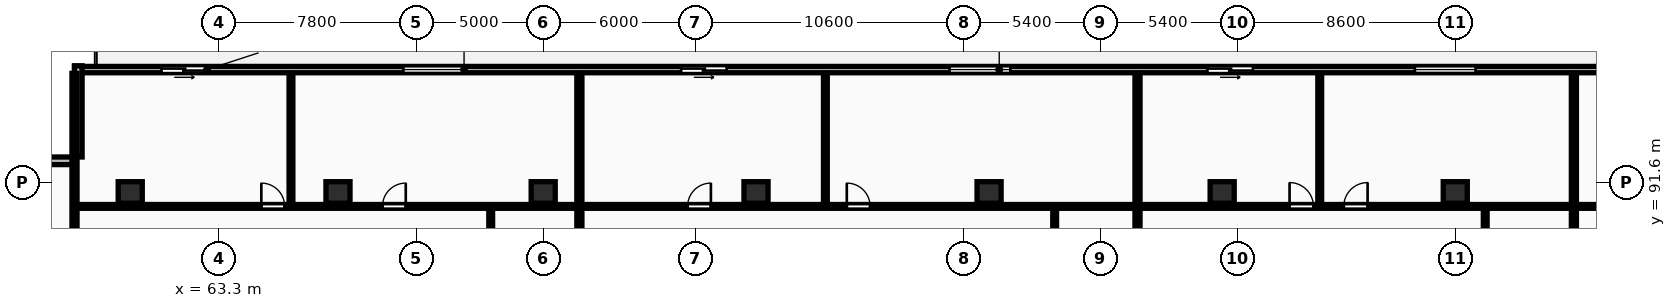
"""IFC4 building model, lengths in metres.
Left out: names, types, materials, properties, quantities, classifications, styles, units other than length and angle.
Written with IfcOpenShell. Run it as: python <this file> out.ifc"""

import sys

from ifc_helpers import new_model, si_unit, direction, frame, frame_2d, origin, origin_2d, place, context, subcontext, project, spatial, rectangle, extrude, element, fill, save


model = new_model("IFC4")
c1 = context("Model", 3, precision=1e-05, world=origin(), true_north=direction((0.0, 1.0)))
c2 = subcontext(c1, "Body", "Model", "MODEL_VIEW")
j1 = project(units=[si_unit("LENGTHUNIT", "METRE"), si_unit("PLANEANGLEUNIT", "RADIAN")], contexts=[c1])
p1 = place(None, origin())
s1 = spatial("IfcSite", under=j1, at=p1, CompositionType="ELEMENT")
p2 = place(p1, origin())
s2 = spatial("IfcBuilding", under=s1, at=p2, CompositionType="ELEMENT")
p3 = place(p2, frame((0.0, 0.0, 93.8)))
s3 = spatial("IfcBuildingStorey", under=s2, at=p3, CompositionType="ELEMENT", Elevation=93.8)
for number, where, z_axis, x_axis in (
    (1, (59.8, 91.2, 0.0), (0.0, 0.0, 1.0), (1.0, 0.0, 0.0)),
    (2, (68.0, 91.2, 0.0), (0.0, 0.0, 1.0), (1.0, 0.0, 0.0)),
    (3, (76.1, 91.2, 0.0), (0.0, 0.0, 1.0), (1.0, 0.0, 0.0)),
    (4, (84.5, 91.2, 0.0), (0.0, 0.0, 1.0), (1.0, 0.0, 0.0)),
    (5, (93.7, 91.2, 0.0), (0.0, 0.0, 1.0), (1.0, 0.0, 0.0)),
    (6, (102.9, 91.2, 0.0), (0.0, 0.0, 1.0), (1.0, 0.0, 0.0)),
    (7, (112.1, 91.2, 0.0), (0.0, 0.0, 1.0), (1.0, 0.0, 0.0)),
):
    element("IfcColumn", number, at=place(p3, frame(where, z_axis=z_axis, x_axis=x_axis)), inside=s3, PredefinedType="COLUMN", context=c2, shape_type="SweptSolid", body=[
        extrude(rectangle(XDim=0.95, YDim=0.85, at=origin_2d()), origin(), (0.0, 0.0, 1.0), 3.25),
    ])
p4 = place(p3, frame((130.6, 96.05, 0.0), z_axis=(0.0, 0.0, 1.0), x_axis=(-1.0, 0.0, 0.0)))
e8 = element("IfcWall", 8, at=p4, inside=s3, PredefinedType="STANDARD", context=c2, shape_type="SweptSolid", body=[
    extrude(rectangle(XDim=73.0, YDim=0.25, at=frame_2d((36.5, 0.0))), origin(), (0.0, 0.0, 1.0), 2.97),
])
p5 = place(p4, frame((67.768, 0.0, 0.0)))
e9 = element("IfcOpeningElement", 9, at=p5, cuts=e8, PredefinedType="OPENING", context=c2, shape_type="SweptSolid", body=[
    extrude(rectangle(XDim=1.8, YDim=2.2, at=frame_2d((0.9, 1.1))), frame((0.0, 0.135, 0.0), z_axis=(0.0, -1.0, 0.0), x_axis=(1.0, 0.0, 0.0)), (0.0, 0.0, 1.0), 0.27),
])
p6 = place(p4, frame((57.624, 0.0, 0.85)))
e10 = element("IfcOpeningElement", 10, at=p6, cuts=e8, PredefinedType="OPENING", context=c2, shape_type="SweptSolid", body=[
    extrude(rectangle(XDim=2.4, YDim=1.9, at=frame_2d((1.2, 0.95))), frame((0.0, 0.135, 0.0), z_axis=(0.0, -1.0, 0.0), x_axis=(1.0, 0.0, 0.0)), (0.0, 0.0, 1.0), 0.27),
])
p7 = place(p4, frame((47.257, 0.0, 0.0)))
e11 = element("IfcOpeningElement", 11, at=p7, cuts=e8, PredefinedType="OPENING", context=c2, shape_type="SweptSolid", body=[
    extrude(rectangle(XDim=1.8, YDim=2.2, at=frame_2d((0.9, 1.1))), frame((0.0, 0.135, 0.0), z_axis=(0.0, -1.0, 0.0), x_axis=(1.0, 0.0, 0.0)), (0.0, 0.0, 1.0), 0.27),
])
p8 = place(p4, frame((36.062, 0.0, 0.85)))
e12 = element("IfcOpeningElement", 12, at=p8, cuts=e8, PredefinedType="OPENING", context=c2, shape_type="SweptSolid", body=[
    extrude(rectangle(XDim=2.4, YDim=1.9, at=frame_2d((1.2, 0.95))), frame((0.0, 0.135, 0.0), z_axis=(0.0, -1.0, 0.0), x_axis=(1.0, 0.0, 0.0)), (0.0, 0.0, 1.0), 0.27),
])
p9 = place(p4, frame((26.486, 0.0, 0.0)))
e13 = element("IfcOpeningElement", 13, at=p9, cuts=e8, PredefinedType="OPENING", context=c2, shape_type="SweptSolid", body=[
    extrude(rectangle(XDim=1.8, YDim=2.2, at=frame_2d((0.9, 1.1))), frame((0.0, 0.135, 0.0), z_axis=(0.0, -1.0, 0.0), x_axis=(1.0, 0.0, 0.0)), (0.0, 0.0, 1.0), 0.27),
])
p10 = place(p4, frame((17.694, 0.0, 0.85)))
e14 = element("IfcOpeningElement", 14, at=p10, cuts=e8, PredefinedType="OPENING", context=c2, shape_type="SweptSolid", body=[
    extrude(rectangle(XDim=2.4, YDim=1.9, at=frame_2d((1.2, 0.95))), frame((0.0, 0.135, 0.0), z_axis=(0.0, -1.0, 0.0), x_axis=(1.0, 0.0, 0.0)), (0.0, 0.0, 1.0), 0.27),
])
p11 = place(p4, frame((7.989, 0.0, 0.0)))
e15 = element("IfcOpeningElement", 15, at=p11, cuts=e8, PredefinedType="OPENING", context=c2, shape_type="SweptSolid", body=[
    extrude(rectangle(XDim=1.8, YDim=2.2, at=frame_2d((0.9, 1.1))), frame((0.0, 0.135, 0.0), z_axis=(0.0, -1.0, 0.0), x_axis=(1.0, 0.0, 0.0)), (0.0, 0.0, 1.0), 0.27),
])
p12 = place(p4, frame((0.9, 0.0, 0.85)))
e16 = element("IfcOpeningElement", 16, at=p12, cuts=e8, PredefinedType="OPENING", context=c2, shape_type="SweptSolid", body=[
    extrude(rectangle(XDim=2.4, YDim=1.9, at=frame_2d((1.2, 0.95))), frame((0.0, 0.135, 0.0), z_axis=(0.0, -1.0, 0.0), x_axis=(1.0, 0.0, 0.0)), (0.0, 0.0, 1.0), 0.27),
])
p13 = place(p3, frame((57.75, 96.2, 0.0), z_axis=(0.0, 0.0, 1.0), x_axis=(0.0, -1.0, 0.0)))
e17 = element("IfcWall", 17, at=p13, inside=s3, PredefinedType="STANDARD", context=c2, shape_type="SweptSolid", body=[
    extrude(rectangle(XDim=3.6, YDim=0.3, at=frame_2d((1.8, 0.0))), origin(), (0.0, 0.0, 1.0), 2.97),
])
p14 = place(p3, frame((57.6, 92.45, 0.0), z_axis=(0.0, 0.0, 1.0), x_axis=(-1.0, 0.0, 0.0)))
e18 = element("IfcWall", 18, at=p14, inside=s3, PredefinedType="STANDARD", context=c2, shape_type="SweptSolid", body=[
    extrude(rectangle(XDim=3.6, YDim=0.3, at=frame_2d((1.8, 0.0))), origin(), (0.0, 0.0, 1.0), 2.97),
])
for number, where, z_axis, x_axis in (
    (19, (57.6, 69.83, 0.0), (0.0, 0.0, 1.0), (0.0, 1.0, 0.0)),
    (20, (77.528, 69.83, 0.0), (0.0, 0.0, 1.0), (0.0, 1.0, 0.0)),
):
    element("IfcWall", number, at=place(p3, frame(where, z_axis=z_axis, x_axis=x_axis)), inside=s3, PredefinedType="PARTITIONING", context=c2, shape_type="SweptSolid", body=[
        extrude(rectangle(XDim=26.07, YDim=0.2, at=frame_2d((13.035, 0.0))), origin(), (0.0, 0.0, 1.0), 2.97),
    ])
p15 = place(p3, frame((74.028, 69.81, 0.0), z_axis=(0.0, 0.0, 1.0), x_axis=(0.0, 1.0, 0.0)))
e21 = element("IfcWall", 21, at=p15, inside=s3, PredefinedType="PARTITIONING", context=c2, shape_type="SweptSolid", body=[
    extrude(rectangle(XDim=20.78, YDim=0.15, at=frame_2d((10.39, 0.0))), origin(), (0.0, 0.0, 1.0), 2.97),
])
p16 = place(p15, frame((2.406, 0.0, 0.0)))
e22 = element("IfcOpeningElement", 22, at=p16, cuts=e21, PredefinedType="OPENING", context=c2, shape_type="SweptSolid", body=[
    extrude(rectangle(XDim=0.96, YDim=2.1, at=frame_2d((0.48, 1.05))), frame((0.0, 0.085, 0.0), z_axis=(0.0, -1.0, 0.0), x_axis=(1.0, 0.0, 0.0)), (0.0, 0.0, 1.0), 0.17),
])
p17 = place(p15, frame((6.133, 0.0, 0.0)))
e23 = element("IfcOpeningElement", 23, at=p17, cuts=e21, PredefinedType="OPENING", context=c2, shape_type="SweptSolid", body=[
    extrude(rectangle(XDim=0.88, YDim=2.06, at=frame_2d((0.44, 1.03))), frame((0.0, 0.085, 0.0), z_axis=(0.0, -1.0, 0.0), x_axis=(1.0, 0.0, 0.0)), (0.0, 0.0, 1.0), 0.17),
])
p18 = place(p15, frame((11.615, 0.0, 0.0)))
e24 = element("IfcOpeningElement", 24, at=p18, cuts=e21, PredefinedType="OPENING", context=c2, shape_type="SweptSolid", body=[
    extrude(rectangle(XDim=0.84, YDim=2.04, at=frame_2d((0.42, 1.02))), frame((0.0, 0.085, 0.0), z_axis=(0.0, -1.0, 0.0), x_axis=(1.0, 0.0, 0.0)), (0.0, 0.0, 1.0), 0.17),
])
p19 = place(p3, frame((66.144, 90.73, 0.0), z_axis=(0.0, 0.0, 1.0), x_axis=(0.0, 1.0, 0.0)))
e25 = element("IfcWall", 25, at=p19, inside=s3, PredefinedType="PARTITIONING", context=c2, shape_type="SweptSolid", body=[
    extrude(rectangle(XDim=5.17, YDim=0.15, at=frame_2d((2.585, 0.0))), origin(), (0.0, 0.0, 1.0), 2.97),
])
p20 = place(p3, frame((57.68, 90.65, 0.0), z_axis=(0.0, 0.0, 1.0), x_axis=(1.0, 0.0, 0.0)))
e26 = element("IfcWall", 26, at=p20, inside=s3, PredefinedType="PARTITIONING", context=c2, shape_type="SweptSolid", body=[
    extrude(rectangle(XDim=19.769, YDim=0.15, at=frame_2d((9.884, 0.0))), origin(), (0.0, 0.0, 1.0), 2.97),
])
p21 = place(p20, frame((7.294, 0.0, 0.0)))
e27 = element("IfcOpeningElement", 27, at=p21, cuts=e26, PredefinedType="OPENING", context=c2, shape_type="SweptSolid", body=[
    extrude(rectangle(XDim=0.92, YDim=2.08, at=frame_2d((0.46, 1.04))), frame((0.0, 0.085, 0.0), z_axis=(0.0, -1.0, 0.0), x_axis=(1.0, 0.0, 0.0)), (0.0, 0.0, 1.0), 0.17),
])
p22 = place(p20, frame((12.076, 0.0, 0.0)))
e28 = element("IfcOpeningElement", 28, at=p22, cuts=e26, PredefinedType="OPENING", context=c2, shape_type="SweptSolid", body=[
    extrude(rectangle(XDim=0.92, YDim=2.08, at=frame_2d((0.46, 1.04))), frame((0.0, 0.085, 0.0), z_axis=(0.0, -1.0, 0.0), x_axis=(1.0, 0.0, 0.0)), (0.0, 0.0, 1.0), 0.17),
])
p23 = place(p3, frame((99.558, 69.83, 0.0), z_axis=(0.0, 0.0, 1.0), x_axis=(0.0, 1.0, 0.0)))
e29 = element("IfcWall", 29, at=p23, inside=s3, PredefinedType="PARTITIONING", context=c2, shape_type="SweptSolid", body=[
    extrude(rectangle(XDim=26.07, YDim=0.2, at=frame_2d((13.035, 0.0))), origin(), (0.0, 0.0, 1.0), 2.97),
])
p24 = place(p3, frame((96.288, 69.81, 0.0), z_axis=(0.0, 0.0, 1.0), x_axis=(0.0, 1.0, 0.0)))
e30 = element("IfcWall", 30, at=p24, inside=s3, PredefinedType="PARTITIONING", context=c2, shape_type="SweptSolid", body=[
    extrude(rectangle(XDim=20.78, YDim=0.15, at=frame_2d((10.39, 0.0))), origin(), (0.0, 0.0, 1.0), 2.97),
])
p25 = place(p24, frame((2.406, 0.0, 0.0)))
e31 = element("IfcOpeningElement", 31, at=p25, cuts=e30, PredefinedType="OPENING", context=c2, shape_type="SweptSolid", body=[
    extrude(rectangle(XDim=0.96, YDim=2.1, at=frame_2d((0.48, 1.05))), frame((0.0, 0.085, 0.0), z_axis=(0.0, -1.0, 0.0), x_axis=(1.0, 0.0, 0.0)), (0.0, 0.0, 1.0), 0.17),
])
p26 = place(p24, frame((6.133, 0.0, 0.0)))
e32 = element("IfcOpeningElement", 32, at=p26, cuts=e30, PredefinedType="OPENING", context=c2, shape_type="SweptSolid", body=[
    extrude(rectangle(XDim=0.88, YDim=2.06, at=frame_2d((0.44, 1.03))), frame((0.0, 0.085, 0.0), z_axis=(0.0, -1.0, 0.0), x_axis=(1.0, 0.0, 0.0)), (0.0, 0.0, 1.0), 0.17),
])
p27 = place(p24, frame((11.615, 0.0, 0.0)))
e33 = element("IfcOpeningElement", 33, at=p27, cuts=e30, PredefinedType="OPENING", context=c2, shape_type="SweptSolid", body=[
    extrude(rectangle(XDim=0.84, YDim=2.04, at=frame_2d((0.42, 1.02))), frame((0.0, 0.085, 0.0), z_axis=(0.0, -1.0, 0.0), x_axis=(1.0, 0.0, 0.0)), (0.0, 0.0, 1.0), 0.17),
])
p28 = place(p3, frame((87.238, 90.73, 0.0), z_axis=(0.0, 0.0, 1.0), x_axis=(0.0, 1.0, 0.0)))
e34 = element("IfcWall", 34, at=p28, inside=s3, PredefinedType="PARTITIONING", context=c2, shape_type="SweptSolid", body=[
    extrude(rectangle(XDim=5.17, YDim=0.15, at=frame_2d((2.585, 0.0))), origin(), (0.0, 0.0, 1.0), 2.97),
])
p29 = place(p3, frame((77.608, 90.65, 0.0), z_axis=(0.0, 0.0, 1.0), x_axis=(1.0, 0.0, 0.0)))
e35 = element("IfcWall", 35, at=p29, inside=s3, PredefinedType="PARTITIONING", context=c2, shape_type="SweptSolid", body=[
    extrude(rectangle(XDim=21.87, YDim=0.15, at=frame_2d((10.935, 0.0))), origin(), (0.0, 0.0, 1.0), 2.97),
])
p30 = place(p29, frame((4.191, 0.0, 0.0)))
e36 = element("IfcOpeningElement", 36, at=p30, cuts=e35, PredefinedType="OPENING", context=c2, shape_type="SweptSolid", body=[
    extrude(rectangle(XDim=0.92, YDim=2.08, at=frame_2d((0.46, 1.04))), frame((0.0, 0.085, 0.0), z_axis=(0.0, -1.0, 0.0), x_axis=(1.0, 0.0, 0.0)), (0.0, 0.0, 1.0), 0.17),
])
p31 = place(p29, frame((10.475, 0.0, 0.0)))
e37 = element("IfcOpeningElement", 37, at=p31, cuts=e35, PredefinedType="OPENING", context=c2, shape_type="SweptSolid", body=[
    extrude(rectangle(XDim=0.92, YDim=2.08, at=frame_2d((0.46, 1.04))), frame((0.0, 0.085, 0.0), z_axis=(0.0, -1.0, 0.0), x_axis=(1.0, 0.0, 0.0)), (0.0, 0.0, 1.0), 0.17),
])
p32 = place(p3, frame((116.783, 69.83, 0.0), z_axis=(0.0, 0.0, 1.0), x_axis=(0.0, 1.0, 0.0)))
e38 = element("IfcWall", 38, at=p32, inside=s3, PredefinedType="PARTITIONING", context=c2, shape_type="SweptSolid", body=[
    extrude(rectangle(XDim=26.07, YDim=0.2, at=frame_2d((13.035, 0.0))), origin(), (0.0, 0.0, 1.0), 2.97),
])
p33 = place(p3, frame((113.283, 69.81, 0.0), z_axis=(0.0, 0.0, 1.0), x_axis=(0.0, 1.0, 0.0)))
e39 = element("IfcWall", 39, at=p33, inside=s3, PredefinedType="PARTITIONING", context=c2, shape_type="SweptSolid", body=[
    extrude(rectangle(XDim=20.78, YDim=0.15, at=frame_2d((10.39, 0.0))), origin(), (0.0, 0.0, 1.0), 2.97),
])
p34 = place(p33, frame((2.406, 0.0, 0.0)))
e40 = element("IfcOpeningElement", 40, at=p34, cuts=e39, PredefinedType="OPENING", context=c2, shape_type="SweptSolid", body=[
    extrude(rectangle(XDim=0.96, YDim=2.1, at=frame_2d((0.48, 1.05))), frame((0.0, 0.085, 0.0), z_axis=(0.0, -1.0, 0.0), x_axis=(1.0, 0.0, 0.0)), (0.0, 0.0, 1.0), 0.17),
])
p35 = place(p33, frame((6.133, 0.0, 0.0)))
e41 = element("IfcOpeningElement", 41, at=p35, cuts=e39, PredefinedType="OPENING", context=c2, shape_type="SweptSolid", body=[
    extrude(rectangle(XDim=0.88, YDim=2.06, at=frame_2d((0.44, 1.03))), frame((0.0, 0.085, 0.0), z_axis=(0.0, -1.0, 0.0), x_axis=(1.0, 0.0, 0.0)), (0.0, 0.0, 1.0), 0.17),
])
p36 = place(p33, frame((11.615, 0.0, 0.0)))
e42 = element("IfcOpeningElement", 42, at=p36, cuts=e39, PredefinedType="OPENING", context=c2, shape_type="SweptSolid", body=[
    extrude(rectangle(XDim=0.84, YDim=2.04, at=frame_2d((0.42, 1.02))), frame((0.0, 0.085, 0.0), z_axis=(0.0, -1.0, 0.0), x_axis=(1.0, 0.0, 0.0)), (0.0, 0.0, 1.0), 0.17),
])
p37 = place(p3, frame((106.75, 90.73, 0.0), z_axis=(0.0, 0.0, 1.0), x_axis=(0.0, 1.0, 0.0)))
e43 = element("IfcWall", 43, at=p37, inside=s3, PredefinedType="PARTITIONING", context=c2, shape_type="SweptSolid", body=[
    extrude(rectangle(XDim=5.17, YDim=0.15, at=frame_2d((2.585, 0.0))), origin(), (0.0, 0.0, 1.0), 2.97),
])
p38 = place(p3, frame((99.638, 90.65, 0.0), z_axis=(0.0, 0.0, 1.0), x_axis=(1.0, 0.0, 0.0)))
e44 = element("IfcWall", 44, at=p38, inside=s3, PredefinedType="PARTITIONING", context=c2, shape_type="SweptSolid", body=[
    extrude(rectangle(XDim=17.065, YDim=0.15, at=frame_2d((8.532, 0.0))), origin(), (0.0, 0.0, 1.0), 2.97),
])
p39 = place(p38, frame((5.922, 0.0, 0.0)))
e45 = element("IfcOpeningElement", 45, at=p39, cuts=e44, PredefinedType="OPENING", context=c2, shape_type="SweptSolid", body=[
    extrude(rectangle(XDim=0.94, YDim=2.1, at=frame_2d((0.47, 1.05))), frame((0.0, 0.085, 0.0), z_axis=(0.0, -1.0, 0.0), x_axis=(1.0, 0.0, 0.0)), (0.0, 0.0, 1.0), 0.17),
])
p40 = place(p38, frame((8.062, 0.0, 0.0)))
e46 = element("IfcOpeningElement", 46, at=p40, cuts=e44, PredefinedType="OPENING", context=c2, shape_type="SweptSolid", body=[
    extrude(rectangle(XDim=0.94, YDim=2.1, at=frame_2d((0.47, 1.05))), frame((0.0, 0.085, 0.0), z_axis=(0.0, -1.0, 0.0), x_axis=(1.0, 0.0, 0.0)), (0.0, 0.0, 1.0), 0.17),
])
p41 = place(p3, frame((116.863, 90.65, 0.0), z_axis=(0.0, 0.0, 1.0), x_axis=(1.0, 0.0, 0.0)))
e47 = element("IfcWall", 47, at=p41, inside=s3, PredefinedType="PARTITIONING", context=c2, shape_type="SweptSolid", body=[
    extrude(rectangle(XDim=13.657, YDim=0.15, at=frame_2d((6.829, 0.0))), origin(), (0.0, 0.0, 1.0), 2.97),
])
p42 = place(p41, frame((6.359, 0.0, 0.0)))
e48 = element("IfcOpeningElement", 48, at=p42, cuts=e47, PredefinedType="OPENING", context=c2, shape_type="SweptSolid", body=[
    extrude(rectangle(XDim=0.94, YDim=2.1, at=frame_2d((0.47, 1.05))), frame((0.0, 0.085, 0.0), z_axis=(0.0, -1.0, 0.0), x_axis=(1.0, 0.0, 0.0)), (0.0, 0.0, 1.0), 0.17),
])
p43 = place(p5, origin())
e49 = element("IfcDoor", 49, at=p43, inside=s3, OperationType="SLIDING_TO_LEFT", PredefinedType="DOOR", context=c2, shape_type="SweptSolid", body=[
    extrude(rectangle(XDim=1.8, YDim=2.2, at=frame_2d((0.9, 1.1))), frame((0.0, 0.025, 0.0), z_axis=(0.0, -1.0, 0.0), x_axis=(1.0, 0.0, 0.0)), (0.0, 0.0, 1.0), 0.05),
])
fill(e9, e49)
p44 = place(p6, origin())
e50 = element("IfcWindow", 50, at=p44, inside=s3, PartitioningType="DOUBLE_PANEL_VERTICAL", PredefinedType="WINDOW", context=c2, shape_type="SweptSolid", body=[
    extrude(rectangle(XDim=2.4, YDim=1.9, at=frame_2d((1.2, 0.95))), frame((0.0, 0.03, 0.0), z_axis=(0.0, -1.0, 0.0), x_axis=(1.0, 0.0, 0.0)), (0.0, 0.0, 1.0), 0.06),
])
fill(e10, e50)
p45 = place(p7, origin())
e51 = element("IfcDoor", 51, at=p45, inside=s3, OperationType="SLIDING_TO_LEFT", PredefinedType="DOOR", context=c2, shape_type="SweptSolid", body=[
    extrude(rectangle(XDim=1.8, YDim=2.2, at=frame_2d((0.9, 1.1))), frame((0.0, 0.025, 0.0), z_axis=(0.0, -1.0, 0.0), x_axis=(1.0, 0.0, 0.0)), (0.0, 0.0, 1.0), 0.05),
])
fill(e11, e51)
p46 = place(p8, origin())
e52 = element("IfcWindow", 52, at=p46, inside=s3, PartitioningType="DOUBLE_PANEL_VERTICAL", PredefinedType="WINDOW", context=c2, shape_type="SweptSolid", body=[
    extrude(rectangle(XDim=2.4, YDim=1.9, at=frame_2d((1.2, 0.95))), frame((0.0, 0.03, 0.0), z_axis=(0.0, -1.0, 0.0), x_axis=(1.0, 0.0, 0.0)), (0.0, 0.0, 1.0), 0.06),
])
fill(e12, e52)
p47 = place(p9, origin())
e53 = element("IfcDoor", 53, at=p47, inside=s3, OperationType="SLIDING_TO_LEFT", PredefinedType="DOOR", context=c2, shape_type="SweptSolid", body=[
    extrude(rectangle(XDim=1.8, YDim=2.2, at=frame_2d((0.9, 1.1))), frame((0.0, 0.025, 0.0), z_axis=(0.0, -1.0, 0.0), x_axis=(1.0, 0.0, 0.0)), (0.0, 0.0, 1.0), 0.05),
])
fill(e13, e53)
p48 = place(p10, origin())
e54 = element("IfcWindow", 54, at=p48, inside=s3, PartitioningType="DOUBLE_PANEL_VERTICAL", PredefinedType="WINDOW", context=c2, shape_type="SweptSolid", body=[
    extrude(rectangle(XDim=2.4, YDim=1.9, at=frame_2d((1.2, 0.95))), frame((0.0, 0.03, 0.0), z_axis=(0.0, -1.0, 0.0), x_axis=(1.0, 0.0, 0.0)), (0.0, 0.0, 1.0), 0.06),
])
fill(e14, e54)
p49 = place(p21, origin())
e55 = element("IfcDoor", 55, at=p49, inside=s3, OperationType="SINGLE_SWING_LEFT", PredefinedType="DOOR", context=c2, shape_type="SweptSolid", body=[
    extrude(rectangle(XDim=0.92, YDim=2.08, at=frame_2d((0.46, 1.04))), frame((0.0, 0.025, 0.0), z_axis=(0.0, -1.0, 0.0), x_axis=(1.0, 0.0, 0.0)), (0.0, 0.0, 1.0), 0.05),
])
fill(e27, e55)
p50 = place(p22, origin())
e56 = element("IfcDoor", 56, at=p50, inside=s3, OperationType="SINGLE_SWING_RIGHT", PredefinedType="DOOR", context=c2, shape_type="SweptSolid", body=[
    extrude(rectangle(XDim=0.92, YDim=2.08, at=frame_2d((0.46, 1.04))), frame((0.0, 0.025, 0.0), z_axis=(0.0, -1.0, 0.0), x_axis=(1.0, 0.0, 0.0)), (0.0, 0.0, 1.0), 0.05),
])
fill(e28, e56)
p51 = place(p30, origin())
e57 = element("IfcDoor", 57, at=p51, inside=s3, OperationType="SINGLE_SWING_RIGHT", PredefinedType="DOOR", context=c2, shape_type="SweptSolid", body=[
    extrude(rectangle(XDim=0.92, YDim=2.08, at=frame_2d((0.46, 1.04))), frame((0.0, 0.025, 0.0), z_axis=(0.0, -1.0, 0.0), x_axis=(1.0, 0.0, 0.0)), (0.0, 0.0, 1.0), 0.05),
])
fill(e36, e57)
p52 = place(p31, origin())
e58 = element("IfcDoor", 58, at=p52, inside=s3, OperationType="SINGLE_SWING_LEFT", PredefinedType="DOOR", context=c2, shape_type="SweptSolid", body=[
    extrude(rectangle(XDim=0.92, YDim=2.08, at=frame_2d((0.46, 1.04))), frame((0.0, 0.025, 0.0), z_axis=(0.0, -1.0, 0.0), x_axis=(1.0, 0.0, 0.0)), (0.0, 0.0, 1.0), 0.05),
])
fill(e37, e58)
p53 = place(p39, origin())
e59 = element("IfcDoor", 59, at=p53, inside=s3, OperationType="SINGLE_SWING_LEFT", PredefinedType="DOOR", context=c2, shape_type="SweptSolid", body=[
    extrude(rectangle(XDim=0.94, YDim=2.1, at=frame_2d((0.47, 1.05))), frame((0.0, 0.025, 0.0), z_axis=(0.0, -1.0, 0.0), x_axis=(1.0, 0.0, 0.0)), (0.0, 0.0, 1.0), 0.05),
])
fill(e45, e59)
p54 = place(p40, origin())
e60 = element("IfcDoor", 60, at=p54, inside=s3, OperationType="SINGLE_SWING_RIGHT", PredefinedType="DOOR", context=c2, shape_type="SweptSolid", body=[
    extrude(rectangle(XDim=0.94, YDim=2.1, at=frame_2d((0.47, 1.05))), frame((0.0, 0.025, 0.0), z_axis=(0.0, -1.0, 0.0), x_axis=(1.0, 0.0, 0.0)), (0.0, 0.0, 1.0), 0.05),
])
fill(e46, e60)
save(model, sys.argv[1])
